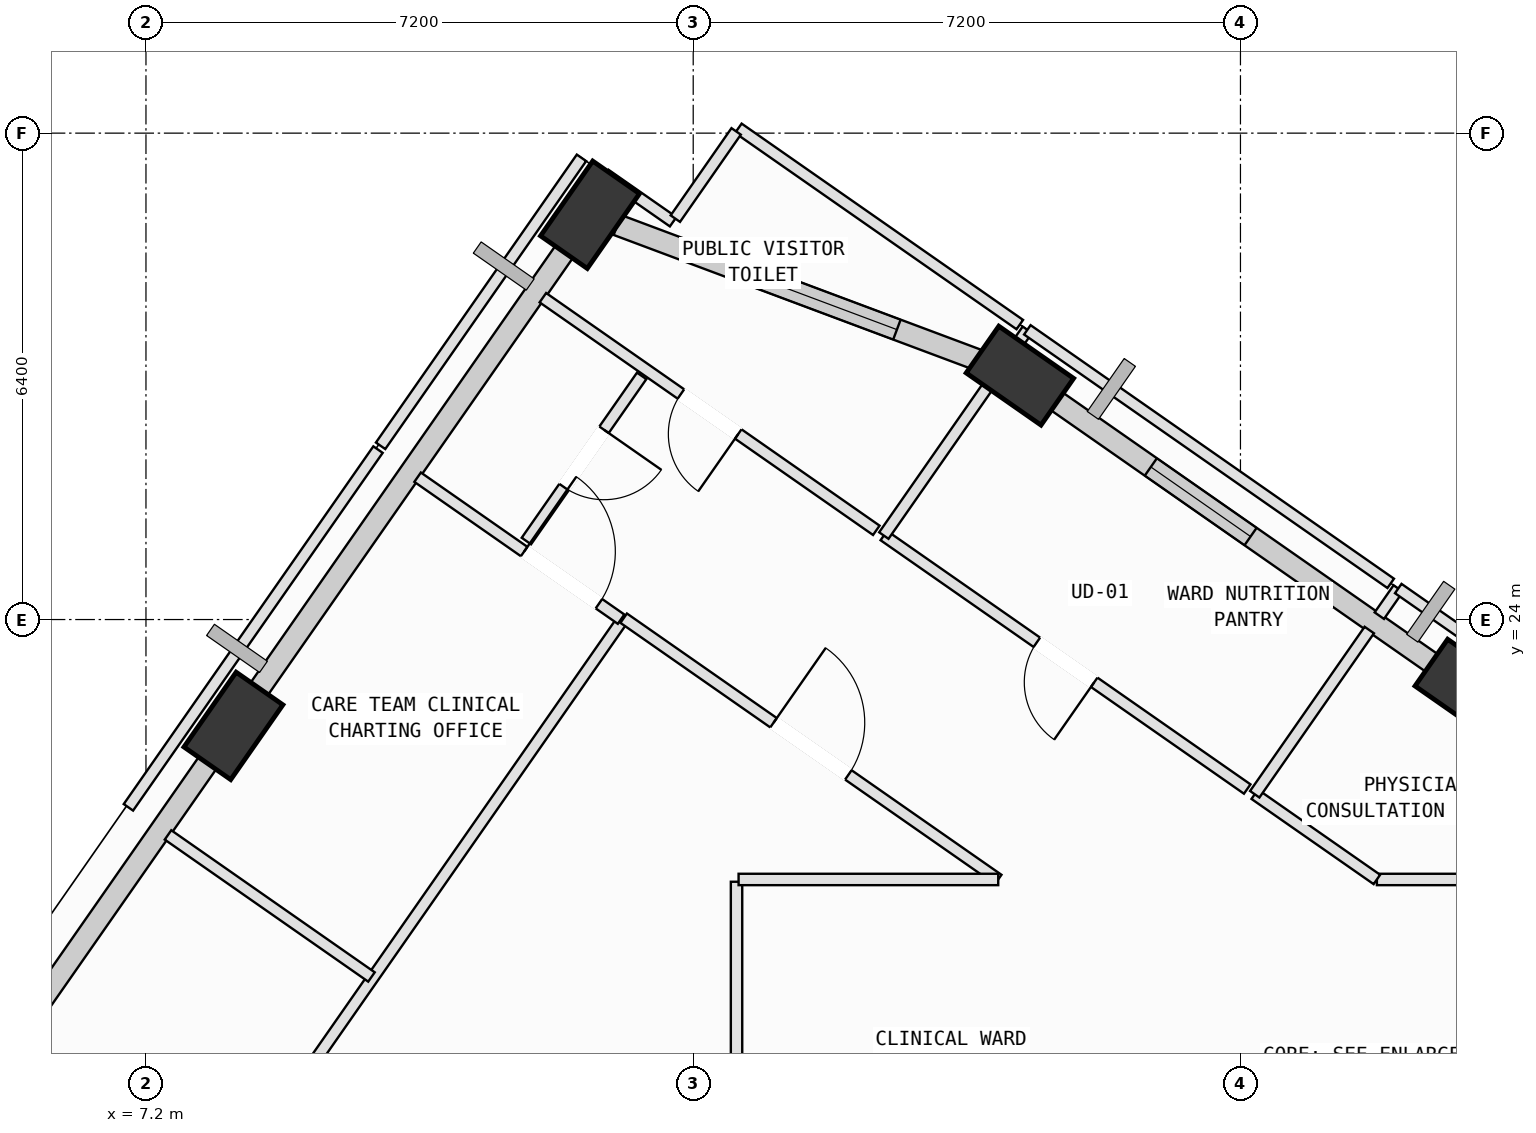
"""IFC4 building model, lengths in metres.
Left out: names, types, materials, properties, quantities, classifications, styles, units other than length and angle.
Written with IfcOpenShell. Run it as: python <this file> out.ifc"""

import sys

from ifc_helpers import new_model, si_unit, direction, frame, frame_2d, origin, origin_2d, place, context, subcontext, project, spatial, rectangle, extrude, element, fill, save


model = new_model("IFC4")
c1 = context("Model", 3, precision=1e-05, world=origin(), true_north=direction((0.0, 1.0)))
c2 = subcontext(c1, "Body", "Model", "MODEL_VIEW")
j1 = project(units=[si_unit("LENGTHUNIT", "METRE"), si_unit("PLANEANGLEUNIT", "RADIAN")], contexts=[c1])
p1 = place(None, origin())
s1 = spatial("IfcSite", under=j1, at=p1, CompositionType="ELEMENT")
p2 = place(p1, origin())
s2 = spatial("IfcBuilding", under=s1, at=p2, CompositionType="ELEMENT")
p3 = place(p2, frame((0.0, 0.0, 259.2)))
s3 = spatial("IfcBuildingStorey", under=s2, at=p3, CompositionType="ELEMENT", Elevation=259.2)
p4 = place(p3, frame((24.604, 23.09, 0.002), z_axis=(0.007386709361, -0.037177735545, 0.999281368036), x_axis=(-0.915845651097, 0.400944413579, 0.021686875903)))
e1 = element("IfcColumn", 1, at=p4, inside=s3, PredefinedType="COLUMN", context=c2, shape_type="SweptSolid", body=[
    extrude(rectangle(XDim=1.2, YDim=0.75, at=origin_2d()), origin(), (0.0, 0.0, 1.0), 3.999),
])
p5 = place(p3, frame((18.698, 27.209, 0.002), z_axis=(-0.009450651527, -0.061703608682, 0.998049773238), x_axis=(-0.724246077082, 0.688616038079, 0.035715149892)))
e2 = element("IfcColumn", 2, at=p5, inside=s3, PredefinedType="COLUMN", context=c2, shape_type="SweptSolid", body=[
    extrude(rectangle(XDim=1.2, YDim=0.75, at=origin_2d()), origin(), (0.0, 0.0, 1.0), 4.004),
])
p6 = place(p3, frame((13.042, 29.326, 0.002), z_axis=(-0.018014447345, -0.085081747932, 0.996211110084), x_axis=(0.728978609548, 0.680810293974, 0.071326926471)))
e3 = element("IfcColumn", 3, at=p6, inside=s3, PredefinedType="COLUMN", context=c2, shape_type="SweptSolid", body=[
    extrude(rectangle(XDim=1.2, YDim=0.75, at=origin_2d()), origin(), (0.0, 0.0, 1.0), 4.011),
])
p7 = place(p3, frame((8.351, 22.601, 0.002), z_axis=(0.009964092293, -0.104015402478, 0.994525772875), x_axis=(0.491758834687, 0.866503859195, 0.08569895278)))
e4 = element("IfcColumn", 4, at=p7, inside=s3, PredefinedType="COLUMN", context=c2, shape_type="SweptSolid", body=[
    extrude(rectangle(XDim=1.2, YDim=0.75, at=origin_2d()), origin(), (0.0, 0.0, 1.0), 4.018),
])
p8 = place(p3, frame((19.056, 26.959, 0.0), z_axis=(0.0, 0.0, 1.0), x_axis=(0.820153911143, -0.572142955945, 0.0)))
e5 = element("IfcWall", 5, at=p8, inside=s3, PredefinedType="SOLIDWALL", context=c2, shape_type="SweptSolid", body=[
    extrude(rectangle(XDim=6.424, YDim=0.28, at=frame_2d((3.212, 0.0))), origin(), (0.0, 0.0, 1.0), 3.265),
])
p9 = place(p8, frame((1.664, 0.0, 0.75)))
e6 = element("IfcOpeningElement", 6, at=p9, cuts=e5, PredefinedType="OPENING", context=c2, shape_type="SweptSolid", body=[
    extrude(rectangle(XDim=1.6, YDim=1.95, at=frame_2d((0.8, 0.975))), frame((0.0, 0.15, 0.0), z_axis=(0.0, -1.0, 0.0), x_axis=(1.0, 0.0, 0.0)), (0.0, 0.0, 1.0), 0.3),
])
p10 = place(p3, frame((13.402, 29.191, 0.0), z_axis=(0.0, 0.0, 1.0), x_axis=(0.936554152669, -0.350522922387, 0.0)))
e7 = element("IfcWall", 7, at=p10, inside=s3, PredefinedType="SOLIDWALL", context=c2, shape_type="SweptSolid", body=[
    extrude(rectangle(XDim=5.302, YDim=0.28, at=frame_2d((2.651, 0.0))), origin(), (0.0, 0.0, 1.0), 3.265),
])
p11 = place(p10, frame((1.927, 0.0, 0.75)))
e8 = element("IfcOpeningElement", 8, at=p11, cuts=e7, PredefinedType="OPENING", context=c2, shape_type="SweptSolid", body=[
    extrude(rectangle(XDim=2.0, YDim=1.95, at=frame_2d((1.0, 0.975))), frame((0.0, 0.15, 0.0), z_axis=(0.0, -1.0, 0.0), x_axis=(1.0, 0.0, 0.0)), (0.0, 0.0, 1.0), 0.3),
])
p12 = place(p3, frame((8.473, 22.776, 0.0), z_axis=(0.0, 0.0, 1.0), x_axis=(0.572143582382, 0.820153474137, 0.0)))
e9 = element("IfcWall", 9, at=p12, inside=s3, PredefinedType="SOLIDWALL", context=c2, shape_type="SweptSolid", body=[
    extrude(rectangle(XDim=7.434, YDim=0.28, at=frame_2d((3.717, 0.0))), origin(), (0.0, 0.0, 1.0), 3.265),
])
p13 = place(p3, frame((3.763, 16.024, 0.0), z_axis=(0.0, 0.0, 1.0), x_axis=(0.572152513546, 0.820147243635, 0.0)))
e10 = element("IfcWall", 10, at=p13, inside=s3, PredefinedType="SOLIDWALL", context=c2, shape_type="SweptSolid", body=[
    extrude(rectangle(XDim=7.485, YDim=0.28, at=frame_2d((3.742, 0.0))), origin(), (0.0, 0.0, 1.0), 3.265),
])
p14 = place(p3, frame((14.97, 20.55, 0.0), z_axis=(0.0, 0.0, 1.0), x_axis=(0.0, -1.0, 0.0)))
e11 = element("IfcWall", 11, at=p14, inside=s3, PredefinedType="PARTITIONING", context=c2, shape_type="SweptSolid", body=[
    extrude(rectangle(XDim=2.32, YDim=0.15, at=frame_2d((1.16, 0.0))), origin(), (0.0, 0.0, 1.0), 3.78),
])
p15 = place(p3, frame((5.155, 12.077, 0.0), z_axis=(0.0, 0.0, 1.0), x_axis=(0.572137005571, 0.820158062118, 0.0)))
e12 = element("IfcWall", 12, at=p15, inside=s3, PredefinedType="PARTITIONING", context=c2, shape_type="SweptSolid", body=[
    extrude(rectangle(XDim=14.56, YDim=0.15, at=frame_2d((7.28, 0.0))), origin(), (0.0, 0.0, 1.0), 3.78),
])
p16 = place(p3, frame((13.485, 24.018, 0.0), z_axis=(0.0, 0.0, 1.0), x_axis=(0.820137595975, -0.572166342656, 0.0)))
e13 = element("IfcWall", 13, at=p16, inside=s3, PredefinedType="PARTITIONING", context=c2, shape_type="SweptSolid", body=[
    extrude(rectangle(XDim=6.009, YDim=0.15, at=frame_2d((3.004, 0.0))), origin(), (0.0, 0.0, 1.0), 3.415),
])
p17 = place(p16, frame((2.404, 0.0, 0.0)))
e14 = element("IfcOpeningElement", 14, at=p17, cuts=e13, PredefinedType="OPENING", context=c2, shape_type="SweptSolid", body=[
    extrude(rectangle(XDim=1.2, YDim=2.15, at=frame_2d((0.6, 1.075))), frame((0.0, 0.085, 0.0), z_axis=(0.0, -1.0, 0.0), x_axis=(1.0, 0.0, 0.0)), (0.0, 0.0, 1.0), 0.17),
])
p18 = place(p3, frame((18.413, 20.58, 0.0), z_axis=(0.0, 0.0, 1.0), x_axis=(-1.0, 0.0, 0.0)))
e15 = element("IfcWall", 15, at=p18, inside=s3, PredefinedType="PARTITIONING", context=c2, shape_type="SweptSolid", body=[
    extrude(rectangle(XDim=3.416, YDim=0.15, at=frame_2d((1.708, 0.0))), origin(), (0.0, 0.0, 1.0), 3.78),
])
p19 = place(p3, frame((27.901, 20.58, 0.0), z_axis=(0.0, 0.0, 1.0), x_axis=(-1.0, 0.0, 0.0)))
e16 = element("IfcWall", 16, at=p19, inside=s3, PredefinedType="PARTITIONING", context=c2, shape_type="SweptSolid", body=[
    extrude(rectangle(XDim=4.506, YDim=0.15, at=frame_2d((2.253, 0.0))), origin(), (0.0, 0.0, 1.0), 3.415),
])
p20 = place(p19, frame((1.753, 0.0, 0.0)))
e17 = element("IfcOpeningElement", 17, at=p20, cuts=e16, PredefinedType="OPENING", context=c2, shape_type="SweptSolid", body=[
    extrude(rectangle(XDim=1.0, YDim=2.12, at=frame_2d((0.5, 1.06))), frame((0.0, 0.085, 0.0), z_axis=(0.0, -1.0, 0.0), x_axis=(1.0, 0.0, 0.0)), (0.0, 0.0, 1.0), 0.17),
])
p21 = place(p3, frame((23.395, 20.58, 0.0), z_axis=(0.0, 0.0, 1.0), x_axis=(-0.820190863983, 0.572089981244, 0.0)))
e18 = element("IfcWall", 18, at=p21, inside=s3, PredefinedType="PARTITIONING", context=c2, shape_type="SweptSolid", body=[
    extrude(rectangle(XDim=1.959, YDim=0.15, at=frame_2d((0.979, 0.0))), origin(), (0.0, 0.0, 1.0), 3.415),
])
p22 = place(p3, frame((21.788, 21.701, 0.0), z_axis=(0.0, 0.0, 1.0), x_axis=(0.571943852359, 0.820292770752, 0.0)))
e19 = element("IfcWall", 19, at=p22, inside=s3, PredefinedType="PARTITIONING", context=c2, shape_type="SweptSolid", body=[
    extrude(rectangle(XDim=2.635, YDim=0.15, at=frame_2d((1.317, 0.0))), origin(), (0.0, 0.0, 1.0), 3.78),
])
p23 = place(p3, frame((23.427, 24.051, 0.0), z_axis=(0.0, 0.0, 1.0), x_axis=(0.572181596024, 0.820126954301, 0.0)))
e20 = element("IfcWall", 20, at=p23, inside=s3, PredefinedType="PARTITIONING", context=c2, shape_type="SweptSolid", body=[
    extrude(rectangle(XDim=0.435, YDim=0.15, at=frame_2d((0.218, 0.0))), origin(), (0.0, 0.0, 1.0), 3.78),
])
p24 = place(p3, frame((23.676, 24.408, 0.0), z_axis=(0.0, 0.0, 1.0), x_axis=(0.820121300716, -0.57218969941, 0.0)))
e21 = element("IfcWall", 21, at=p24, inside=s3, PredefinedType="PARTITIONING", context=c2, shape_type="SweptSolid", body=[
    extrude(rectangle(XDim=5.655, YDim=0.15, at=frame_2d((2.828, 0.0))), origin(), (0.0, 0.0, 1.0), 3.78),
])
p25 = place(p3, frame((21.689, 21.77, 0.0), z_axis=(0.0, 0.0, 1.0), x_axis=(-0.820177227942, 0.572109530393, 0.0)))
e22 = element("IfcWall", 22, at=p25, inside=s3, PredefinedType="PARTITIONING", context=c2, shape_type="SweptSolid", body=[
    extrude(rectangle(XDim=5.829, YDim=0.15, at=frame_2d((2.915, 0.0))), origin(), (0.0, 0.0, 1.0), 3.78),
])
p26 = place(p25, frame((2.455, 0.0, 0.0)))
e23 = element("IfcOpeningElement", 23, at=p26, cuts=e22, PredefinedType="OPENING", context=c2, shape_type="SweptSolid", body=[
    extrude(rectangle(XDim=0.92, YDim=2.1, at=frame_2d((0.46, 1.05))), frame((0.0, 0.085, 0.0), z_axis=(0.0, -1.0, 0.0), x_axis=(1.0, 0.0, 0.0)), (0.0, 0.0, 1.0), 0.17),
])
p27 = place(p3, frame((16.908, 25.105, 0.0), z_axis=(0.0, 0.0, 1.0), x_axis=(0.571980057707, 0.820267525619, 0.0)))
e24 = element("IfcWall", 24, at=p27, inside=s3, PredefinedType="PARTITIONING", context=c2, shape_type="SweptSolid", body=[
    extrude(rectangle(XDim=2.577, YDim=0.15, at=frame_2d((1.289, 0.0))), origin(), (0.0, 0.0, 1.0), 3.78),
])
p28 = place(p3, frame((18.48, 27.359, 0.0), z_axis=(0.0, 0.0, 1.0), x_axis=(0.571918856156, 0.820310198628, 0.0)))
e25 = element("IfcWall", 25, at=p28, inside=s3, PredefinedType="PARTITIONING", context=c2, shape_type="SweptSolid", body=[
    extrude(rectangle(XDim=0.552, YDim=0.15, at=frame_2d((0.276, 0.0))), origin(), (0.0, 0.0, 1.0), 3.78),
])
p29 = place(p3, frame((18.796, 27.812, 0.0), z_axis=(0.0, 0.0, 1.0), x_axis=(0.820098618175, -0.572222208995, 0.0)))
e26 = element("IfcWall", 26, at=p29, inside=s3, PredefinedType="PARTITIONING", context=c2, shape_type="SweptSolid", body=[
    extrude(rectangle(XDim=5.83, YDim=0.15, at=frame_2d((2.915, 0.0))), origin(), (0.0, 0.0, 1.0), 3.78),
])
p30 = place(p3, frame((14.994, 30.464, 0.0), z_axis=(0.0, 0.0, 1.0), x_axis=(0.820185960607, -0.572097011025, 0.0)))
e27 = element("IfcWall", 27, at=p30, inside=s3, PredefinedType="PARTITIONING", context=c2, shape_type="SweptSolid", body=[
    extrude(rectangle(XDim=4.515, YDim=0.15, at=frame_2d((2.257, 0.0))), origin(), (0.0, 0.0, 1.0), 3.78),
])
p31 = place(p3, frame((16.809, 25.174, 0.0), z_axis=(0.0, 0.0, 1.0), x_axis=(-0.820095076811, 0.572227284382, 0.0)))
e28 = element("IfcWall", 28, at=p31, inside=s3, PredefinedType="PARTITIONING", context=c2, shape_type="SweptSolid", body=[
    extrude(rectangle(XDim=5.349, YDim=0.15, at=frame_2d((2.675, 0.0))), origin(), (0.0, 0.0, 1.0), 3.78),
])
p32 = place(p31, frame((2.215, 0.0, 0.0)))
e29 = element("IfcOpeningElement", 29, at=p32, cuts=e28, PredefinedType="OPENING", context=c2, shape_type="SweptSolid", body=[
    extrude(rectangle(XDim=0.92, YDim=2.1, at=frame_2d((0.46, 1.05))), frame((0.0, 0.085, 0.0), z_axis=(0.0, -1.0, 0.0), x_axis=(1.0, 0.0, 0.0)), (0.0, 0.0, 1.0), 0.17),
])
p33 = place(p3, frame((12.57, 28.982, 0.0), z_axis=(0.0, 0.0, 1.0), x_axis=(0.572257804194, 0.820073780546, 0.0)))
e30 = element("IfcWall", 30, at=p33, inside=s3, PredefinedType="PARTITIONING", context=c2, shape_type="SweptSolid", body=[
    extrude(rectangle(XDim=1.102, YDim=0.15, at=frame_2d((0.551, 0.0))), origin(), (0.0, 0.0, 1.0), 3.265),
])
p34 = place(p3, frame((13.242, 29.857, 0.0), z_axis=(0.0, 0.0, 1.0), x_axis=(0.82043001279, -0.57174696686, 0.0)))
e31 = element("IfcWall", 31, at=p34, inside=s3, PredefinedType="PARTITIONING", context=c2, shape_type="SweptSolid", body=[
    extrude(rectangle(XDim=1.09, YDim=0.15, at=frame_2d((0.545, 0.0))), origin(), (0.0, 0.0, 1.0), 3.78),
])
p35 = place(p3, frame((14.165, 29.275, 0.0), z_axis=(0.0, 0.0, 1.0), x_axis=(0.571693029817, 0.820467598177, 0.0)))
e32 = element("IfcWall", 32, at=p35, inside=s3, PredefinedType="PARTITIONING", context=c2, shape_type="SweptSolid", body=[
    extrude(rectangle(XDim=1.399, YDim=0.15, at=frame_2d((0.7, 0.0))), origin(), (0.0, 0.0, 1.0), 3.78),
])
p36 = place(p3, frame((10.774, 25.873, 0.0), z_axis=(0.0, 0.0, 1.0), x_axis=(0.820056757322, -0.572282198544, 0.0)))
e33 = element("IfcWall", 33, at=p36, inside=s3, PredefinedType="PARTITIONING", context=c2, shape_type="SweptSolid", body=[
    extrude(rectangle(XDim=3.264, YDim=0.15, at=frame_2d((1.632, 0.0))), origin(), (0.0, 0.0, 1.0), 3.78),
])
p37 = place(p36, frame((1.709, 0.0, 0.0)))
e34 = element("IfcOpeningElement", 34, at=p37, cuts=e33, PredefinedType="OPENING", context=c2, shape_type="SweptSolid", body=[
    extrude(rectangle(XDim=1.2, YDim=2.15, at=frame_2d((0.6, 1.075))), frame((0.0, 0.085, 0.0), z_axis=(0.0, -1.0, 0.0), x_axis=(1.0, 0.0, 0.0)), (0.0, 0.0, 1.0), 0.17),
])
p38 = place(p3, frame((10.167, 19.297, 0.0), z_axis=(0.0, 0.0, 1.0), x_axis=(-0.819951461255, 0.57243305389, 0.0)))
e35 = element("IfcWall", 35, at=p38, inside=s3, PredefinedType="PARTITIONING", context=c2, shape_type="SweptSolid", body=[
    extrude(rectangle(XDim=3.265, YDim=0.15, at=frame_2d((1.632, 0.0))), origin(), (0.0, 0.0, 1.0), 3.78),
])
p39 = place(p3, frame((6.969, 21.529, 0.0), z_axis=(0.0, 0.0, 1.0), x_axis=(0.572176938358, 0.820130203816, 0.0)))
e36 = element("IfcWall", 36, at=p39, inside=s3, PredefinedType="PARTITIONING", context=c2, shape_type="SweptSolid", body=[
    extrude(rectangle(XDim=5.739, YDim=0.15, at=frame_2d((2.87, 0.0))), origin(), (0.0, 0.0, 1.0), 3.78),
])
p40 = place(p3, frame((13.722, 27.206, 0.0), z_axis=(0.0, 0.0, 1.0), x_axis=(-0.57236747175, -0.819997242241, 0.0)))
e37 = element("IfcWall", 37, at=p40, inside=s3, PredefinedType="PARTITIONING", context=c2, shape_type="SweptSolid", body=[
    extrude(rectangle(XDim=2.65, YDim=0.15, at=frame_2d((1.325, 0.0))), origin(), (0.0, 0.0, 1.0), 3.78),
])
p41 = place(p40, frame((0.865, 0.0, 0.0)))
e38 = element("IfcOpeningElement", 38, at=p41, cuts=e37, PredefinedType="OPENING", context=c2, shape_type="SweptSolid", body=[
    extrude(rectangle(XDim=0.92, YDim=2.1, at=frame_2d((0.46, 1.05))), frame((0.0, 0.085, 0.0), z_axis=(0.0, -1.0, 0.0), x_axis=(1.0, 0.0, 0.0)), (0.0, 0.0, 1.0), 0.17),
])
p42 = place(p3, frame((10.287, 26.286, 0.0), z_axis=(0.0, 0.0, 1.0), x_axis=(0.572078260331, 0.820199039293, 0.0)))
e39 = element("IfcWall", 39, at=p42, inside=s3, PredefinedType="PARTITIONING", context=c2, shape_type="SweptSolid", body=[
    extrude(rectangle(XDim=4.62, YDim=0.15, at=frame_2d((2.31, 0.0))), origin(), (0.0, 0.0, 1.0), 3.78),
])
p43 = place(p9, origin())
e40 = element("IfcWindow", 40, at=p43, inside=s3, PartitioningType="SINGLE_PANEL", PredefinedType="WINDOW", context=c2, shape_type="SweptSolid", body=[
    extrude(rectangle(XDim=1.6, YDim=1.95, at=frame_2d((0.8, 0.975))), frame((0.0, 0.03, 0.0), z_axis=(0.0, -1.0, 0.0), x_axis=(1.0, 0.0, 0.0)), (0.0, 0.0, 1.0), 0.06),
])
fill(e6, e40)
p44 = place(p11, origin())
e41 = element("IfcWindow", 41, at=p44, inside=s3, PartitioningType="SINGLE_PANEL", PredefinedType="WINDOW", context=c2, shape_type="SweptSolid", body=[
    extrude(rectangle(XDim=2.0, YDim=1.95, at=frame_2d((1.0, 0.975))), frame((0.0, 0.03, 0.0), z_axis=(0.0, -1.0, 0.0), x_axis=(1.0, 0.0, 0.0)), (0.0, 0.0, 1.0), 0.06),
])
fill(e8, e41)
p45 = place(p17, origin())
e42 = element("IfcDoor", 42, at=p45, inside=s3, OperationType="SINGLE_SWING_LEFT", PredefinedType="DOOR", context=c2, shape_type="SweptSolid", body=[
    extrude(rectangle(XDim=1.2, YDim=2.15, at=frame_2d((0.6, 1.075))), frame((0.0, 0.025, 0.0), z_axis=(0.0, -1.0, 0.0), x_axis=(1.0, 0.0, 0.0)), (0.0, 0.0, 1.0), 0.05),
])
fill(e14, e42)
p46 = place(p26, origin())
e43 = element("IfcDoor", 43, at=p46, inside=s3, OperationType="SINGLE_SWING_LEFT", PredefinedType="DOOR", context=c2, shape_type="SweptSolid", body=[
    extrude(rectangle(XDim=0.92, YDim=2.1, at=frame_2d((0.46, 1.05))), frame((0.0, 0.025, 0.0), z_axis=(0.0, -1.0, 0.0), x_axis=(1.0, 0.0, 0.0)), (0.0, 0.0, 1.0), 0.05),
])
fill(e23, e43)
p47 = place(p32, origin())
e44 = element("IfcDoor", 44, at=p47, inside=s3, OperationType="SINGLE_SWING_LEFT", PredefinedType="DOOR", context=c2, shape_type="SweptSolid", body=[
    extrude(rectangle(XDim=0.92, YDim=2.1, at=frame_2d((0.46, 1.05))), frame((0.0, 0.025, 0.0), z_axis=(0.0, -1.0, 0.0), x_axis=(1.0, 0.0, 0.0)), (0.0, 0.0, 1.0), 0.05),
])
fill(e29, e44)
p48 = place(p37, origin())
e45 = element("IfcDoor", 45, at=p48, inside=s3, OperationType="SINGLE_SWING_LEFT", PredefinedType="DOOR", context=c2, shape_type="SweptSolid", body=[
    extrude(rectangle(XDim=1.2, YDim=2.15, at=frame_2d((0.6, 1.075))), frame((0.0, 0.025, 0.0), z_axis=(0.0, -1.0, 0.0), x_axis=(1.0, 0.0, 0.0)), (0.0, 0.0, 1.0), 0.05),
])
fill(e34, e45)
p49 = place(p41, origin())
e46 = element("IfcDoor", 46, at=p49, inside=s3, OperationType="SINGLE_SWING_LEFT", PredefinedType="DOOR", context=c2, shape_type="SweptSolid", body=[
    extrude(rectangle(XDim=0.92, YDim=2.1, at=frame_2d((0.46, 1.05))), frame((0.0, 0.025, 0.0), z_axis=(0.0, -1.0, 0.0), x_axis=(1.0, 0.0, 0.0)), (0.0, 0.0, 1.0), 0.05),
])
fill(e38, e46)
save(model, sys.argv[1])
